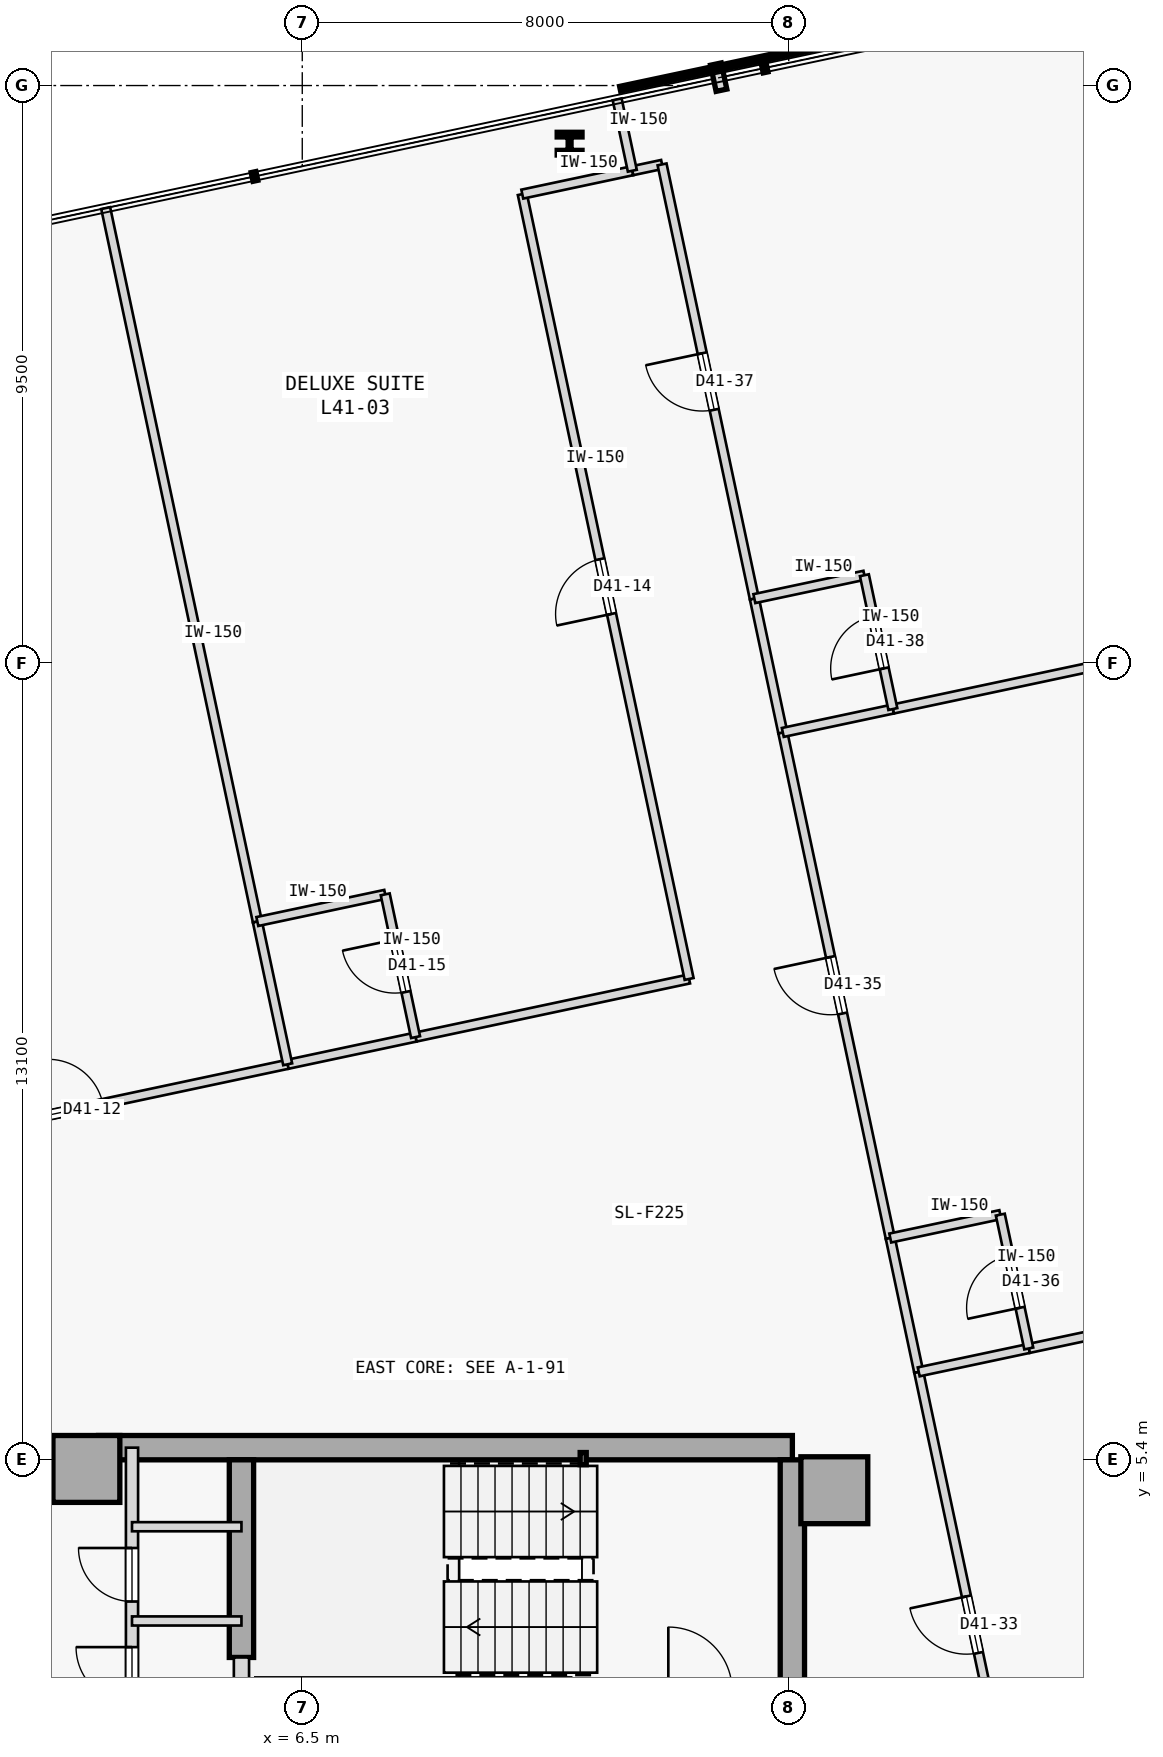
"""IFC4 building model, lengths in metres.
Left out: names, types, materials, properties, quantities, classifications, styles, units other than length and angle.
Written with IfcOpenShell. Run it as: python <this file> out.ifc"""

import sys

from ifc_helpers import new_model, si_unit, direction, frame, frame_2d, origin, origin_2d, place, context, subcontext, project, spatial, rectangle, hollow_rectangle, i_section, extrude, element, fill, save


model = new_model("IFC4")
c1 = context("Model", 3, precision=1e-05, world=origin(), true_north=direction((0.0, 1.0)))
c2 = subcontext(c1, "Body", "Model", "MODEL_VIEW")
j1 = project(units=[si_unit("LENGTHUNIT", "METRE"), si_unit("PLANEANGLEUNIT", "RADIAN")], contexts=[c1])
p1 = place(None, origin())
s1 = spatial("IfcSite", under=j1, at=p1, CompositionType="ELEMENT")
p2 = place(p1, origin())
s2 = spatial("IfcBuilding", under=s1, at=p2, CompositionType="ELEMENT")
p3 = place(p2, frame((0.0, 0.0, 161.6)))
s3 = spatial("IfcBuildingStorey", under=s2, at=p3, CompositionType="ELEMENT", Elevation=161.6)
for number, where, z_axis, x_axis in (
    (1, (15.25, 4.9, 0.0), (0.0, 0.0, 1.0), (1.0, 0.0, 0.0)),
    (2, (2.95, 5.25, 0.0), (0.0, 0.0, 1.0), (1.0, 0.0, 0.0)),
):
    element("IfcColumn", number, at=place(p3, frame(where, z_axis=z_axis, x_axis=x_axis)), inside=s3, PredefinedType="COLUMN", context=c2, shape_type="SweptSolid", body=[
        extrude(rectangle(XDim=1.1, YDim=1.1, at=origin_2d()), origin(), (0.0, 0.0, 1.0), 3.4),
    ])
p4 = place(p3, frame((3.15, 5.6, 0.0), z_axis=(0.0, 0.0, 1.0), x_axis=(1.0, 0.0, 0.0)))
e3 = element("IfcWall", 3, at=p4, inside=s3, PredefinedType="SHEAR", context=c2, shape_type="SweptSolid", body=[
    extrude(rectangle(XDim=11.41, YDim=0.4, at=frame_2d((5.705, 0.0))), origin(), (0.0, 0.0, 1.0), 3.175),
])
p5 = place(p3, frame((14.56, -5.4, 0.0), z_axis=(0.0, 0.0, 1.0), x_axis=(0.0, 1.0, 0.0)))
e4 = element("IfcWall", 4, at=p5, inside=s3, PredefinedType="SHEAR", context=c2, shape_type="SweptSolid", body=[
    extrude(rectangle(XDim=10.8, YDim=0.4, at=frame_2d((5.4, 0.0))), origin(), (0.0, 0.0, 1.0), 3.175),
])
p6 = place(p3, frame((5.5, 2.15, 0.0), z_axis=(0.0, 0.0, 1.0), x_axis=(0.0, 1.0, 0.0)))
e5 = element("IfcWall", 5, at=p6, inside=s3, PredefinedType="SHEAR", context=c2, shape_type="SweptSolid", body=[
    extrude(rectangle(XDim=3.25, YDim=0.4, at=frame_2d((1.625, 0.0))), origin(), (0.0, 0.0, 1.0), 3.175),
])
p7 = place(p3, frame((11.12, 5.42, 0.0), z_axis=(0.0, 0.0, 1.0), x_axis=(1.0, 0.0, 0.0)))
e6 = element("IfcColumn", 6, at=p7, inside=s3, PredefinedType="COLUMN", context=c2, shape_type="SweptSolid", body=[
    extrude(hollow_rectangle(XDim=0.1, YDim=0.2, WallThickness=0.008, at=origin_2d()), origin(), (0.0, 0.0, 1.0), 3.4),
])
p8 = place(p3, frame((10.896, 27.044, 0.0), z_axis=(0.0, 0.0, 1.0), x_axis=(1.0, 0.0, 0.0)))
e7 = element("IfcColumn", 7, at=p8, inside=s3, PredefinedType="COLUMN", context=c2, shape_type="SweptSolid", body=[
    extrude(i_section(OverallWidth=0.409, OverallDepth=0.374, WebThickness=0.048, FlangeThickness=0.077, FilletRadius=0.015, at=origin_2d()), origin(), (0.0, 0.0, 1.0), 3.4),
])
p9 = place(p3, frame((5.5, 1.6, 0.0), z_axis=(0.0, 0.0, 1.0), x_axis=(0.0, 1.0, 0.0)))
e8 = element("IfcWall", 8, at=p9, inside=s3, PredefinedType="STANDARD", context=c2, shape_type="SweptSolid", body=[
    extrude(rectangle(XDim=0.55, YDim=0.25, at=frame_2d((0.275, 0.0))), origin(), (0.0, 0.0, 1.0), 3.175),
])
p10 = place(p3, frame((3.7, -1.15, 0.0), z_axis=(0.0, 0.0, 1.0), x_axis=(0.0, 1.0, 0.0)))
e9 = element("IfcWall", 9, at=p10, inside=s3, PredefinedType="STANDARD", context=c2, shape_type="SweptSolid", body=[
    extrude(rectangle(XDim=6.75, YDim=0.2, at=frame_2d((3.375, 0.0))), origin(), (0.0, 0.0, 1.0), 3.175),
])
p11 = place(p10, frame((0.35, 0.0, 0.0)))
e10 = element("IfcOpeningElement", 10, at=p11, cuts=e9, PredefinedType="OPENING", context=c2, shape_type="SweptSolid", body=[
    extrude(rectangle(XDim=0.88, YDim=2.15, at=frame_2d((0.44, 1.075))), frame((0.0, 0.11, 0.0), z_axis=(0.0, -1.0, 0.0), x_axis=(1.0, 0.0, 0.0)), (0.0, 0.0, 1.0), 0.22),
])
p12 = place(p10, frame((2.55, 0.0, 0.0)))
e11 = element("IfcOpeningElement", 11, at=p12, cuts=e9, PredefinedType="OPENING", context=c2, shape_type="SweptSolid", body=[
    extrude(rectangle(XDim=0.92, YDim=2.15, at=frame_2d((0.46, 1.075))), frame((0.0, 0.11, 0.0), z_axis=(0.0, -1.0, 0.0), x_axis=(1.0, 0.0, 0.0)), (0.0, 0.0, 1.0), 0.22),
])
p13 = place(p10, frame((4.22, 0.0, 0.0)))
e12 = element("IfcOpeningElement", 12, at=p13, cuts=e9, PredefinedType="OPENING", context=c2, shape_type="SweptSolid", body=[
    extrude(rectangle(XDim=0.88, YDim=2.15, at=frame_2d((0.44, 1.075))), frame((0.0, 0.11, 0.0), z_axis=(0.0, -1.0, 0.0), x_axis=(1.0, 0.0, 0.0)), (0.0, 0.0, 1.0), 0.22),
])
for number, where, z_axis, x_axis in (
    (13, (3.7, 4.3, 0.0), (0.0, 0.0, 1.0), (1.0, 0.0, 0.0)),
    (14, (3.7, 2.75, 0.0), (0.0, 0.0, 1.0), (1.0, 0.0, 0.0)),
):
    element("IfcWall", number, at=place(p3, frame(where, z_axis=z_axis, x_axis=x_axis)), inside=s3, PredefinedType="PARTITIONING", context=c2, shape_type="SweptSolid", body=[
        extrude(rectangle(XDim=1.8, YDim=0.15, at=frame_2d((0.9, 0.0))), origin(), (0.0, 0.0, 1.0), 3.175),
    ])
p14 = place(p3, frame((-0.72, 10.421, 0.0), z_axis=(0.0, 0.0, 1.0), x_axis=(0.978147545754, 0.207911949477, 0.0)))
e15 = element("IfcWall", 15, at=p14, inside=s3, PredefinedType="PARTITIONING", context=c2, shape_type="SweptSolid", body=[
    extrude(rectangle(XDim=7.136, YDim=0.15, at=frame_2d((3.568, 0.0))), origin(), (0.0, 0.0, 1.0), 3.175),
])
p15 = place(p14, frame((3.108, 0.0, 0.0)))
e16 = element("IfcOpeningElement", 16, at=p15, cuts=e15, PredefinedType="OPENING", context=c2, shape_type="SweptSolid", body=[
    extrude(rectangle(XDim=0.92, YDim=2.15, at=frame_2d((0.46, 1.075))), frame((0.0, 0.085, 0.0), z_axis=(0.0, -1.0, 0.0), x_axis=(1.0, 0.0, 0.0)), (0.0, 0.0, 1.0), 0.17),
])
p16 = place(p3, frame((8.363, 12.352, 0.0), z_axis=(0.0, 0.0, 1.0), x_axis=(0.978153723809, 0.20788288193, 0.0)))
e17 = element("IfcWall", 17, at=p16, inside=s3, PredefinedType="PARTITIONING", context=c2, shape_type="SweptSolid", body=[
    extrude(rectangle(XDim=4.599, YDim=0.15, at=frame_2d((2.3, 0.0))), origin(), (0.0, 0.0, 1.0), 3.175),
])
p17 = place(p3, frame((12.862, 13.308, 0.0), z_axis=(0.0, 0.0, 1.0), x_axis=(-0.207911421929, 0.978147657888, 0.0)))
e18 = element("IfcWall", 18, at=p17, inside=s3, PredefinedType="PARTITIONING", context=c2, shape_type="SweptSolid", body=[
    extrude(rectangle(XDim=13.195, YDim=0.15, at=frame_2d((6.598, 0.0))), origin(), (0.0, 0.0, 1.0), 3.175),
])
p18 = place(p17, frame((6.137, 0.0, 0.0)))
e19 = element("IfcOpeningElement", 19, at=p18, cuts=e18, PredefinedType="OPENING", context=c2, shape_type="SweptSolid", body=[
    extrude(rectangle(XDim=0.92, YDim=2.15, at=frame_2d((0.46, 1.075))), frame((0.0, 0.085, 0.0), z_axis=(0.0, -1.0, 0.0), x_axis=(1.0, 0.0, 0.0)), (0.0, 0.0, 1.0), 0.17),
])
p19 = place(p3, frame((10.118, 26.214, 0.0), z_axis=(0.0, 0.0, 1.0), x_axis=(0.978133353907, 0.20797870558, 0.0)))
e20 = element("IfcWall", 20, at=p19, inside=s3, PredefinedType="PARTITIONING", context=c2, shape_type="SweptSolid", body=[
    extrude(rectangle(XDim=1.85, YDim=0.15, at=frame_2d((0.925, 0.0))), origin(), (0.0, 0.0, 1.0), 3.175),
])
p20 = place(p3, frame((6.26, 11.905, 0.0), z_axis=(0.0, 0.0, 1.0), x_axis=(0.978146728319, 0.207915795165, 0.0)))
e21 = element("IfcWall", 21, at=p20, inside=s3, PredefinedType="PARTITIONING", context=c2, shape_type="SweptSolid", body=[
    extrude(rectangle(XDim=2.15, YDim=0.15, at=frame_2d((1.075, 0.0))), origin(), (0.0, 0.0, 1.0), 3.175),
])
p21 = place(p3, frame((18.405, -1.468, 0.0), z_axis=(0.0, 0.0, 1.0), x_axis=(-0.207888984761, 0.97815242678, 0.0)))
e22 = element("IfcWall", 22, at=p21, inside=s3, PredefinedType="PARTITIONING", context=c2, shape_type="SweptSolid", body=[
    extrude(rectangle(XDim=8.5, YDim=0.15, at=frame_2d((4.25, 0.0))), origin(), (0.0, 0.0, 1.0), 3.175),
])
p22 = place(p21, frame((3.775, 0.0, 0.0)))
e23 = element("IfcOpeningElement", 23, at=p22, cuts=e22, PredefinedType="OPENING", context=c2, shape_type="SweptSolid", body=[
    extrude(rectangle(XDim=0.95, YDim=2.15, at=frame_2d((0.475, 1.075))), frame((0.0, 0.085, 0.0), z_axis=(0.0, -1.0, 0.0), x_axis=(1.0, 0.0, 0.0)), (0.0, 0.0, 1.0), 0.17),
])
p23 = place(p3, frame((16.17, 9.047, 0.0), z_axis=(0.0, 0.0, 1.0), x_axis=(-0.2079164651, 0.978146585917, 0.0)))
e24 = element("IfcWall", 24, at=p23, inside=s3, PredefinedType="PARTITIONING", context=c2, shape_type="SweptSolid", body=[
    extrude(rectangle(XDim=8.5, YDim=0.15, at=frame_2d((4.25, 0.0))), origin(), (0.0, 0.0, 1.0), 3.175),
])
p24 = place(p23, frame((3.775, 0.0, 0.0)))
e25 = element("IfcOpeningElement", 25, at=p24, cuts=e24, PredefinedType="OPENING", context=c2, shape_type="SweptSolid", body=[
    extrude(rectangle(XDim=0.95, YDim=2.15, at=frame_2d((0.475, 1.075))), frame((0.0, 0.085, 0.0), z_axis=(0.0, -1.0, 0.0), x_axis=(1.0, 0.0, 0.0)), (0.0, 0.0, 1.0), 0.17),
])
p25 = place(p3, frame((16.638, 6.847, 0.0), z_axis=(0.0, 0.0, 1.0), x_axis=(-0.207913264065, 0.978147266328, 0.0)))
e26 = element("IfcWall", 26, at=p25, inside=s3, PredefinedType="PARTITIONING", context=c2, shape_type="SweptSolid", body=[
    extrude(rectangle(XDim=2.25, YDim=0.15, at=frame_2d((1.125, 0.0))), origin(), (0.0, 0.0, 1.0), 3.175),
])
p26 = place(p3, frame((11.928, 26.599, 0.0), z_axis=(0.0, 0.0, 1.0), x_axis=(0.97822210712, 0.207560856478, 0.0)))
e27 = element("IfcWall", 27, at=p26, inside=s3, PredefinedType="PARTITIONING", context=c2, shape_type="SweptSolid", body=[
    extrude(rectangle(XDim=0.5, YDim=0.15, at=frame_2d((0.25, 0.0))), origin(), (0.0, 0.0, 1.0), 3.175),
])
p27 = place(p3, frame((13.935, 19.562, 0.0), z_axis=(0.0, 0.0, 1.0), x_axis=(-0.207923154003, 0.978145164088, 0.0)))
e28 = element("IfcWall", 28, at=p27, inside=s3, PredefinedType="PARTITIONING", context=c2, shape_type="SweptSolid", body=[
    extrude(rectangle(XDim=7.3, YDim=0.15, at=frame_2d((3.65, 0.0))), origin(), (0.0, 0.0, 1.0), 3.175),
])
p28 = place(p27, frame((3.175, 0.0, 0.0)))
e29 = element("IfcOpeningElement", 29, at=p28, cuts=e28, PredefinedType="OPENING", context=c2, shape_type="SweptSolid", body=[
    extrude(rectangle(XDim=0.95, YDim=2.15, at=frame_2d((0.475, 1.075))), frame((0.0, 0.085, 0.0), z_axis=(0.0, -1.0, 0.0), x_axis=(1.0, 0.0, 0.0)), (0.0, 0.0, 1.0), 0.17),
])
p29 = place(p3, frame((14.403, 17.362, 0.0), z_axis=(0.0, 0.0, 1.0), x_axis=(-0.207913264065, 0.978147266328, 0.0)))
e30 = element("IfcWall", 30, at=p29, inside=s3, PredefinedType="PARTITIONING", context=c2, shape_type="SweptSolid", body=[
    extrude(rectangle(XDim=2.25, YDim=0.15, at=frame_2d((1.125, 0.0))), origin(), (0.0, 0.0, 1.0), 3.175),
])
p30 = place(p3, frame((5.761, 14.252, 0.0), z_axis=(0.0, 0.0, 1.0), x_axis=(-0.207910848762, 0.978147779718, 0.0)))
e31 = element("IfcWall", 31, at=p30, inside=s3, PredefinedType="PARTITIONING", context=c2, shape_type="SweptSolid", body=[
    extrude(rectangle(XDim=11.995, YDim=0.15, at=frame_2d((5.998, 0.0))), origin(), (0.0, 0.0, 1.0), 3.175),
])
p31 = place(p3, frame((6.26, 11.905, 0.0), z_axis=(0.0, 0.0, 1.0), x_axis=(-0.207917150959, 0.978146440129, 0.0)))
e32 = element("IfcWall", 32, at=p31, inside=s3, PredefinedType="PARTITIONING", context=c2, shape_type="SweptSolid", body=[
    extrude(rectangle(XDim=2.4, YDim=0.15, at=frame_2d((1.2, 0.0))), origin(), (0.0, 0.0, 1.0), 3.175),
])
p32 = place(p3, frame((5.761, 14.252, 0.0), z_axis=(0.0, 0.0, 1.0), x_axis=(0.978146728319, 0.207915795165, 0.0)))
e33 = element("IfcWall", 33, at=p32, inside=s3, PredefinedType="PARTITIONING", context=c2, shape_type="SweptSolid", body=[
    extrude(rectangle(XDim=2.15, YDim=0.15, at=frame_2d((1.075, 0.0))), origin(), (0.0, 0.0, 1.0), 3.175),
])
p33 = place(p3, frame((8.363, 12.352, 0.0), z_axis=(0.0, 0.0, 1.0), x_axis=(-0.207917150959, 0.978146440129, 0.0)))
e34 = element("IfcWall", 34, at=p33, inside=s3, PredefinedType="PARTITIONING", context=c2, shape_type="SweptSolid", body=[
    extrude(rectangle(XDim=2.4, YDim=0.15, at=frame_2d((1.2, 0.0))), origin(), (0.0, 0.0, 1.0), 3.175),
])
p34 = place(p33, frame((0.76, 0.0, 0.0)))
e35 = element("IfcOpeningElement", 35, at=p34, cuts=e34, PredefinedType="OPENING", context=c2, shape_type="SweptSolid", body=[
    extrude(rectangle(XDim=0.88, YDim=2.15, at=frame_2d((0.44, 1.075))), frame((0.0, 0.085, 0.0), z_axis=(0.0, -1.0, 0.0), x_axis=(1.0, 0.0, 0.0)), (0.0, 0.0, 1.0), 0.17),
])
p35 = place(p3, frame((11.928, 26.599, 0.0), z_axis=(0.0, 0.0, 1.0), x_axis=(-0.20795853359, 0.978137642823, 0.0)))
e36 = element("IfcWall", 36, at=p35, inside=s3, PredefinedType="PARTITIONING", context=c2, shape_type="SweptSolid", body=[
    extrude(rectangle(XDim=1.2, YDim=0.15, at=frame_2d((0.6, 0.0))), origin(), (0.0, 0.0, 1.0), 3.175),
])
p36 = place(p3, frame((18.447, 7.231, 0.0), z_axis=(0.0, 0.0, 1.0), x_axis=(0.978149634612, 0.207902121941, 0.0)))
e37 = element("IfcWall", 37, at=p36, inside=s3, PredefinedType="PARTITIONING", context=c2, shape_type="SweptSolid", body=[
    extrude(rectangle(XDim=12.187, YDim=0.15, at=frame_2d((6.094, 0.0))), origin(), (0.0, 0.0, 1.0), 3.175),
])
p37 = place(p3, frame((16.638, 6.847, 0.0), z_axis=(0.0, 0.0, 1.0), x_axis=(0.978160192495, 0.207852442415, 0.0)))
e38 = element("IfcWall", 38, at=p37, inside=s3, PredefinedType="PARTITIONING", context=c2, shape_type="SweptSolid", body=[
    extrude(rectangle(XDim=1.85, YDim=0.15, at=frame_2d((0.925, 0.0))), origin(), (0.0, 0.0, 1.0), 3.175),
])
p38 = place(p3, frame((16.17, 9.047, 0.0), z_axis=(0.0, 0.0, 1.0), x_axis=(0.978133353907, 0.20797870558, 0.0)))
e39 = element("IfcWall", 39, at=p38, inside=s3, PredefinedType="PARTITIONING", context=c2, shape_type="SweptSolid", body=[
    extrude(rectangle(XDim=1.85, YDim=0.15, at=frame_2d((0.925, 0.0))), origin(), (0.0, 0.0, 1.0), 3.175),
])
p39 = place(p3, frame((18.447, 7.231, 0.0), z_axis=(0.0, 0.0, 1.0), x_axis=(-0.207891197838, 0.978151956427, 0.0)))
e40 = element("IfcWall", 40, at=p39, inside=s3, PredefinedType="PARTITIONING", context=c2, shape_type="SweptSolid", body=[
    extrude(rectangle(XDim=2.25, YDim=0.15, at=frame_2d((1.125, 0.0))), origin(), (0.0, 0.0, 1.0), 3.175),
])
p40 = place(p39, frame((0.685, 0.0, 0.0)))
e41 = element("IfcOpeningElement", 41, at=p40, cuts=e40, PredefinedType="OPENING", context=c2, shape_type="SweptSolid", body=[
    extrude(rectangle(XDim=0.88, YDim=2.15, at=frame_2d((0.44, 1.075))), frame((0.0, 0.085, 0.0), z_axis=(0.0, -1.0, 0.0), x_axis=(1.0, 0.0, 0.0)), (0.0, 0.0, 1.0), 0.17),
])
p41 = place(p3, frame((16.212, 17.746, 0.0), z_axis=(0.0, 0.0, 1.0), x_axis=(0.978149634612, 0.207902121941, 0.0)))
e42 = element("IfcWall", 42, at=p41, inside=s3, PredefinedType="PARTITIONING", context=c2, shape_type="SweptSolid", body=[
    extrude(rectangle(XDim=12.187, YDim=0.15, at=frame_2d((6.094, 0.0))), origin(), (0.0, 0.0, 1.0), 3.175),
])
for number, where, z_axis, x_axis in (
    (43, (14.403, 17.362, 0.0), (0.0, 0.0, 1.0), (0.978, 0.208, 0.0)),
    (44, (13.935, 19.562, 0.0), (0.0, 0.0, 1.0), (0.978, 0.208, 0.0)),
):
    element("IfcWall", number, at=place(p3, frame(where, z_axis=z_axis, x_axis=x_axis)), inside=s3, PredefinedType="PARTITIONING", context=c2, shape_type="SweptSolid", body=[
        extrude(rectangle(XDim=1.85, YDim=0.15, at=frame_2d((0.925, 0.0))), origin(), (0.0, 0.0, 1.0), 3.175),
    ])
p42 = place(p3, frame((16.212, 17.746, 0.0), z_axis=(0.0, 0.0, 1.0), x_axis=(-0.207913264065, 0.978147266328, 0.0)))
e45 = element("IfcWall", 45, at=p42, inside=s3, PredefinedType="PARTITIONING", context=c2, shape_type="SweptSolid", body=[
    extrude(rectangle(XDim=2.25, YDim=0.15, at=frame_2d((1.125, 0.0))), origin(), (0.0, 0.0, 1.0), 3.175),
])
p43 = place(p42, frame((0.685, 0.0, 0.0)))
e46 = element("IfcOpeningElement", 46, at=p43, cuts=e45, PredefinedType="OPENING", context=c2, shape_type="SweptSolid", body=[
    extrude(rectangle(XDim=0.88, YDim=2.15, at=frame_2d((0.44, 1.075))), frame((0.0, 0.085, 0.0), z_axis=(0.0, -1.0, 0.0), x_axis=(1.0, 0.0, 0.0)), (0.0, 0.0, 1.0), 0.17),
])
p44 = place(p12, origin())
e47 = element("IfcDoor", 47, at=p44, inside=s3, OperationType="SINGLE_SWING_RIGHT", PredefinedType="DOOR", context=c2, shape_type="SweptSolid", body=[
    extrude(rectangle(XDim=0.92, YDim=2.15, at=frame_2d((0.46, 1.075))), frame((0.0, 0.025, 0.0), z_axis=(0.0, -1.0, 0.0), x_axis=(1.0, 0.0, 0.0)), (0.0, 0.0, 1.0), 0.05),
])
fill(e11, e47)
p45 = place(p13, origin())
e48 = element("IfcDoor", 48, at=p45, inside=s3, OperationType="SINGLE_SWING_RIGHT", PredefinedType="DOOR", context=c2, shape_type="SweptSolid", body=[
    extrude(rectangle(XDim=0.88, YDim=2.15, at=frame_2d((0.44, 1.075))), frame((0.0, 0.025, 0.0), z_axis=(0.0, -1.0, 0.0), x_axis=(1.0, 0.0, 0.0)), (0.0, 0.0, 1.0), 0.05),
])
fill(e12, e48)
p46 = place(p15, origin())
e49 = element("IfcDoor", 49, at=p46, inside=s3, OperationType="SINGLE_SWING_LEFT", PredefinedType="DOOR", context=c2, shape_type="SweptSolid", body=[
    extrude(rectangle(XDim=0.92, YDim=2.15, at=frame_2d((0.46, 1.075))), frame((0.0, 0.025, 0.0), z_axis=(0.0, -1.0, 0.0), x_axis=(1.0, 0.0, 0.0)), (0.0, 0.0, 1.0), 0.05),
])
fill(e16, e49)
p47 = place(p18, origin())
e50 = element("IfcDoor", 50, at=p47, inside=s3, OperationType="SINGLE_SWING_LEFT", PredefinedType="DOOR", context=c2, shape_type="SweptSolid", body=[
    extrude(rectangle(XDim=0.92, YDim=2.15, at=frame_2d((0.46, 1.075))), frame((0.0, 0.025, 0.0), z_axis=(0.0, -1.0, 0.0), x_axis=(1.0, 0.0, 0.0)), (0.0, 0.0, 1.0), 0.05),
])
fill(e19, e50)
p48 = place(p34, origin())
e51 = element("IfcDoor", 51, at=p48, inside=s3, OperationType="SINGLE_SWING_RIGHT", PredefinedType="DOOR", context=c2, shape_type="SweptSolid", body=[
    extrude(rectangle(XDim=0.88, YDim=2.15, at=frame_2d((0.44, 1.075))), frame((0.0, 0.025, 0.0), z_axis=(0.0, -1.0, 0.0), x_axis=(1.0, 0.0, 0.0)), (0.0, 0.0, 1.0), 0.05),
])
fill(e35, e51)
p49 = place(p22, origin())
e52 = element("IfcDoor", 52, at=p49, inside=s3, OperationType="SINGLE_SWING_RIGHT", PredefinedType="DOOR", context=c2, shape_type="SweptSolid", body=[
    extrude(rectangle(XDim=0.95, YDim=2.15, at=frame_2d((0.475, 1.075))), frame((0.0, 0.025, 0.0), z_axis=(0.0, -1.0, 0.0), x_axis=(1.0, 0.0, 0.0)), (0.0, 0.0, 1.0), 0.05),
])
fill(e23, e52)
p50 = place(p24, origin())
e53 = element("IfcDoor", 53, at=p50, inside=s3, OperationType="SINGLE_SWING_RIGHT", PredefinedType="DOOR", context=c2, shape_type="SweptSolid", body=[
    extrude(rectangle(XDim=0.95, YDim=2.15, at=frame_2d((0.475, 1.075))), frame((0.0, 0.025, 0.0), z_axis=(0.0, -1.0, 0.0), x_axis=(1.0, 0.0, 0.0)), (0.0, 0.0, 1.0), 0.05),
])
fill(e25, e53)
p51 = place(p40, origin())
e54 = element("IfcDoor", 54, at=p51, inside=s3, OperationType="SINGLE_SWING_LEFT", PredefinedType="DOOR", context=c2, shape_type="SweptSolid", body=[
    extrude(rectangle(XDim=0.88, YDim=2.15, at=frame_2d((0.44, 1.075))), frame((0.0, 0.025, 0.0), z_axis=(0.0, -1.0, 0.0), x_axis=(1.0, 0.0, 0.0)), (0.0, 0.0, 1.0), 0.05),
])
fill(e41, e54)
p52 = place(p28, origin())
e55 = element("IfcDoor", 55, at=p52, inside=s3, OperationType="SINGLE_SWING_RIGHT", PredefinedType="DOOR", context=c2, shape_type="SweptSolid", body=[
    extrude(rectangle(XDim=0.95, YDim=2.15, at=frame_2d((0.475, 1.075))), frame((0.0, 0.025, 0.0), z_axis=(0.0, -1.0, 0.0), x_axis=(1.0, 0.0, 0.0)), (0.0, 0.0, 1.0), 0.05),
])
fill(e29, e55)
p53 = place(p43, origin())
e56 = element("IfcDoor", 56, at=p53, inside=s3, OperationType="SINGLE_SWING_LEFT", PredefinedType="DOOR", context=c2, shape_type="SweptSolid", body=[
    extrude(rectangle(XDim=0.88, YDim=2.15, at=frame_2d((0.44, 1.075))), frame((0.0, 0.025, 0.0), z_axis=(0.0, -1.0, 0.0), x_axis=(1.0, 0.0, 0.0)), (0.0, 0.0, 1.0), 0.05),
])
fill(e46, e56)
save(model, sys.argv[1])
